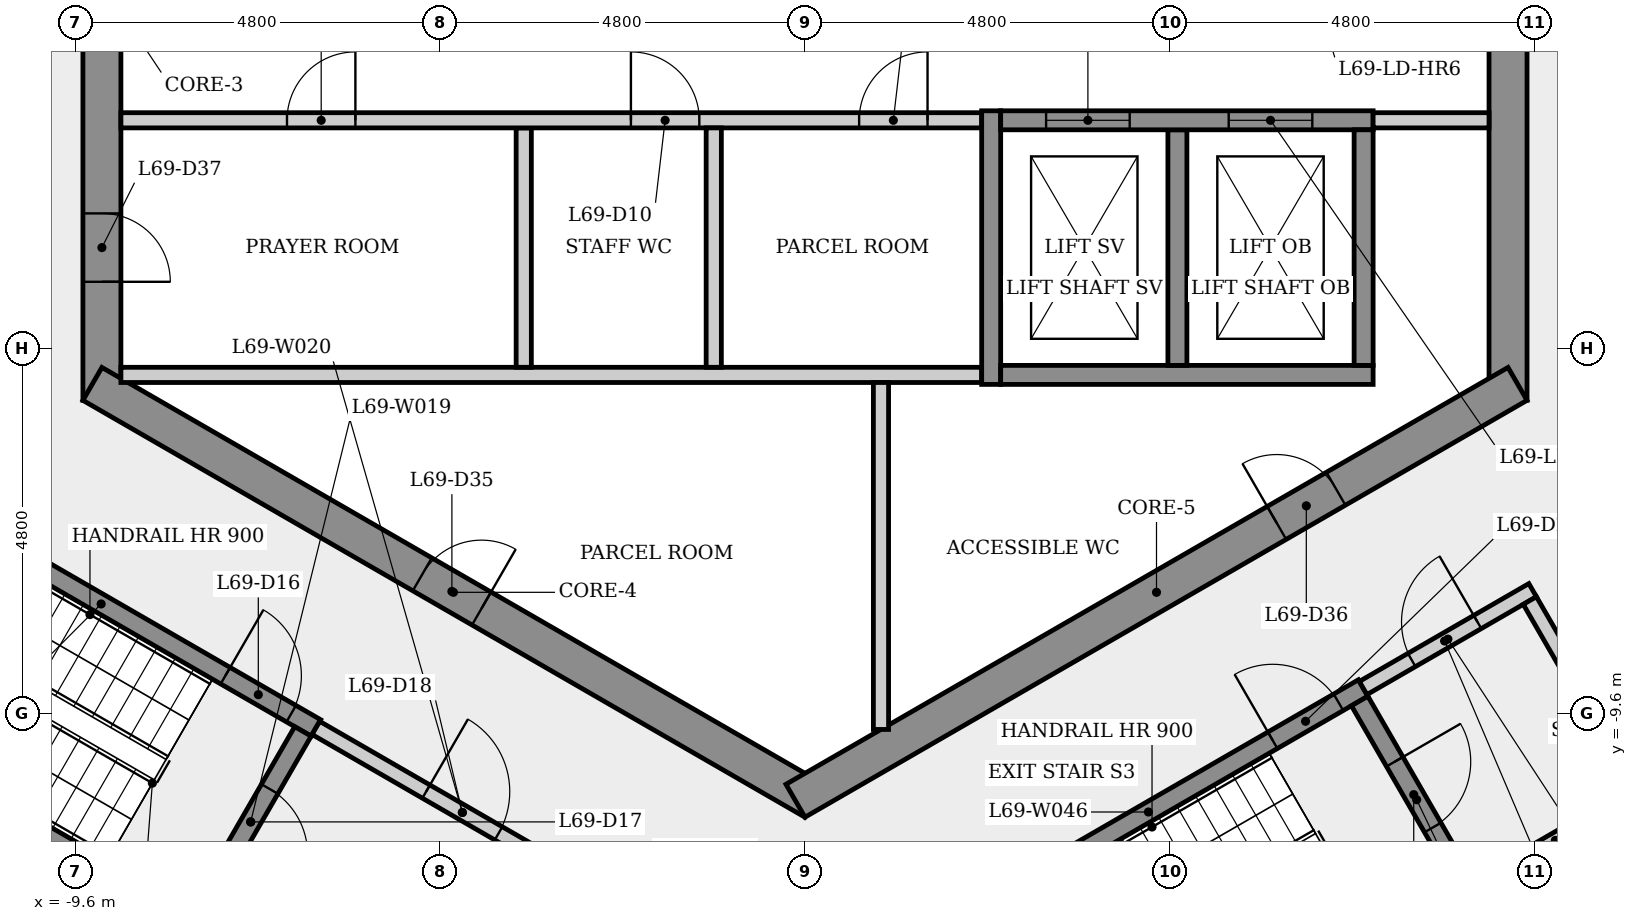
"""IFC4 building model, lengths in metres.
Left out: names, types, materials, properties, quantities, classifications, styles, units other than length and angle.
Written with IfcOpenShell. Run it as: python <this file> out.ifc"""

import sys

from ifc_helpers import new_model, si_unit, direction, frame, frame_2d, origin, place, context, subcontext, project, spatial, rectangle, extrude, element, fill, save


model = new_model("IFC4")
c1 = context("Model", 3, precision=1e-05, world=origin(), true_north=direction((0.0, 1.0)))
c2 = subcontext(c1, "Body", "Model", "MODEL_VIEW")
j1 = project(units=[si_unit("LENGTHUNIT", "METRE"), si_unit("PLANEANGLEUNIT", "RADIAN")], contexts=[c1])
p1 = place(None, origin())
s1 = spatial("IfcSite", under=j1, at=p1, CompositionType="ELEMENT")
p2 = place(p1, origin())
s2 = spatial("IfcBuilding", under=s1, at=p2, CompositionType="ELEMENT")
p3 = place(p2, frame((0.0, 0.0, 257.9)))
s3 = spatial("IfcBuildingStorey", under=s2, at=p3, CompositionType="ELEMENT", Elevation=257.9)
p4 = place(p3, frame((9.25, -5.485, 0.0), z_axis=(0.0, 0.0, 1.0), x_axis=(0.0, 1.0, 0.0)))
e1 = element("IfcWall", 1, at=p4, inside=s3, PredefinedType="SHEAR", context=c2, shape_type="SweptSolid", body=[
    extrude(rectangle(XDim=10.97, YDim=0.5, at=frame_2d((5.485, 0.0))), origin(), (0.0, 0.0, 1.0), 5.0),
])
p5 = place(p4, frame((4.685, 0.0, 0.0)))
e2 = element("IfcOpeningElement", 2, at=p5, cuts=e1, PredefinedType="OPENING", context=c2, shape_type="SweptSolid", body=[
    extrude(rectangle(XDim=1.6, YDim=2.1, at=frame_2d((0.8, 1.05))), frame((0.0, 0.26, 0.0), z_axis=(0.0, -1.0, 0.0), x_axis=(1.0, 0.0, 0.0)), (0.0, 0.0, 1.0), 0.52),
])
p6 = place(p3, frame((-9.25, 5.485, 0.0), z_axis=(0.0, 0.0, 1.0), x_axis=(0.0, -1.0, 0.0)))
e3 = element("IfcWall", 3, at=p6, inside=s3, PredefinedType="SHEAR", context=c2, shape_type="SweptSolid", body=[
    extrude(rectangle(XDim=10.97, YDim=0.5, at=frame_2d((5.485, 0.0))), origin(), (0.0, 0.0, 1.0), 5.0),
])
p7 = place(p6, frame((8.51, 0.0, 0.0)))
e4 = element("IfcOpeningElement", 4, at=p7, cuts=e3, PredefinedType="OPENING", context=c2, shape_type="SweptSolid", body=[
    extrude(rectangle(XDim=0.9, YDim=2.1, at=frame_2d((0.45, 1.05))), frame((0.0, 0.26, 0.0), z_axis=(0.0, -1.0, 0.0), x_axis=(1.0, 0.0, 0.0)), (0.0, 0.0, 1.0), 0.52),
])
p8 = place(p6, frame((4.685, 0.0, 0.0)))
e5 = element("IfcOpeningElement", 5, at=p8, cuts=e3, PredefinedType="OPENING", context=c2, shape_type="SweptSolid", body=[
    extrude(rectangle(XDim=1.6, YDim=2.1, at=frame_2d((0.8, 1.05))), frame((0.0, 0.26, 0.0), z_axis=(0.0, -1.0, 0.0), x_axis=(1.0, 0.0, 0.0)), (0.0, 0.0, 1.0), 0.52),
])
p9 = place(p3, frame((-9.375, -5.268, 0.0), z_axis=(0.0, 0.0, 1.0), x_axis=(0.866023993627, -0.500002442456, 0.0)))
e6 = element("IfcWall", 6, at=p9, inside=s3, PredefinedType="SHEAR", context=c2, shape_type="SweptSolid", body=[
    extrude(rectangle(XDim=10.97, YDim=0.5, at=frame_2d((5.485, 0.0))), origin(), (0.0, 0.0, 1.0), 5.0),
])
p10 = place(p9, frame((5.011, 0.0, 0.0)))
e7 = element("IfcOpeningElement", 7, at=p10, cuts=e6, PredefinedType="OPENING", context=c2, shape_type="SweptSolid", body=[
    extrude(rectangle(XDim=0.9, YDim=2.1, at=frame_2d((0.45, 1.05))), frame((0.0, 0.26, 0.0), z_axis=(0.0, -1.0, 0.0), x_axis=(1.0, 0.0, 0.0)), (0.0, 0.0, 1.0), 0.52),
])
p11 = place(p3, frame((-0.125, -10.753, 0.0), z_axis=(0.0, 0.0, 1.0), x_axis=(0.866023993627, 0.500002442456, 0.0)))
e8 = element("IfcWall", 8, at=p11, inside=s3, PredefinedType="SHEAR", context=c2, shape_type="SweptSolid", body=[
    extrude(rectangle(XDim=10.97, YDim=0.5, at=frame_2d((5.485, 0.0))), origin(), (0.0, 0.0, 1.0), 5.0),
])
p12 = place(p11, frame((7.311, 0.0, 0.0)))
e9 = element("IfcOpeningElement", 9, at=p12, cuts=e8, PredefinedType="OPENING", context=c2, shape_type="SweptSolid", body=[
    extrude(rectangle(XDim=0.9, YDim=2.1, at=frame_2d((0.45, 1.05))), frame((0.0, 0.26, 0.0), z_axis=(0.0, -1.0, 0.0), x_axis=(1.0, 0.0, 0.0)), (0.0, 0.0, 1.0), 0.52),
])
p13 = place(p3, frame((-12.085, -6.532, 0.0), z_axis=(0.0, 0.0, 1.0), x_axis=(0.866031063448, -0.499990197047, 0.0)))
e10 = element("IfcWall", 10, at=p13, inside=s3, PredefinedType="SHEAR", context=c2, shape_type="SweptSolid", body=[
    extrude(rectangle(XDim=6.525, YDim=0.25, at=frame_2d((3.263, 0.0))), origin(), (0.0, 0.0, 1.0), 4.6),
])
p14 = place(p13, frame((5.15, 0.0, 0.0)))
e11 = element("IfcOpeningElement", 11, at=p14, cuts=e10, PredefinedType="OPENING", context=c2, shape_type="SweptSolid", body=[
    extrude(rectangle(XDim=1.0, YDim=2.1, at=frame_2d((0.5, 1.05))), frame((0.0, 0.135, 0.0), z_axis=(0.0, -1.0, 0.0), x_axis=(1.0, 0.0, 0.0)), (0.0, 0.0, 1.0), 0.27),
])
p15 = place(p3, frame((-9.0, -5.15, 0.0), z_axis=(0.0, 0.0, 1.0), x_axis=(1.0, 0.0, 0.0)))
e12 = element("IfcWall", 12, at=p15, inside=s3, PredefinedType="PARTITIONING", context=c2, shape_type="SweptSolid", body=[
    extrude(rectangle(XDim=11.325, YDim=0.2, at=frame_2d((5.663, 0.0))), origin(), (0.0, 0.0, 1.0), 4.6),
])
p16 = place(p3, frame((-7.935, -12.393, 0.0), z_axis=(0.0, 0.0, 1.0), x_axis=(-0.866031063448, 0.499990197047, 0.0)))
e13 = element("IfcWall", 13, at=p16, inside=s3, PredefinedType="SHEAR", context=c2, shape_type="SweptSolid", body=[
    extrude(rectangle(XDim=6.525, YDim=0.25, at=frame_2d((3.263, 0.0))), origin(), (0.0, 0.0, 1.0), 4.6),
])
p17 = place(p3, frame((-6.605, -9.841, 0.0), z_axis=(0.0, 0.0, 1.0), x_axis=(-0.499996545922, -0.866027397988, 0.0)))
e14 = element("IfcWall", 14, at=p17, inside=s3, PredefinedType="SHEAR", context=c2, shape_type="SweptSolid", body=[
    extrude(rectangle(XDim=2.75, YDim=0.25, at=frame_2d((1.375, 0.0))), origin(), (0.0, 0.0, 1.0), 4.6),
])
p18 = place(p17, frame((0.875, 0.0, 0.0)))
e15 = element("IfcOpeningElement", 15, at=p18, cuts=e14, PredefinedType="OPENING", context=c2, shape_type="SweptSolid", body=[
    extrude(rectangle(XDim=1.0, YDim=2.1, at=frame_2d((0.5, 1.05))), frame((0.0, 0.135, 0.0), z_axis=(0.0, -1.0, 0.0), x_axis=(1.0, 0.0, 0.0)), (0.0, 0.0, 1.0), 0.27),
])
p19 = place(p3, frame((-6.435, -9.795, 0.0), z_axis=(0.0, 0.0, 1.0), x_axis=(0.866012907634, -0.500021643343, 0.0)))
e16 = element("IfcWall", 16, at=p19, inside=s3, PredefinedType="PARTITIONING", context=c2, shape_type="SweptSolid", body=[
    extrude(rectangle(XDim=4.45, YDim=0.2, at=frame_2d((2.225, 0.0))), origin(), (0.0, 0.0, 1.0), 4.6),
])
p20 = place(p19, frame((1.675, 0.0, 0.0)))
e17 = element("IfcOpeningElement", 17, at=p20, cuts=e16, PredefinedType="OPENING", context=c2, shape_type="SweptSolid", body=[
    extrude(rectangle(XDim=1.1, YDim=2.1, at=frame_2d((0.55, 1.05))), frame((0.0, 0.11, 0.0), z_axis=(0.0, -1.0, 0.0), x_axis=(1.0, 0.0, 0.0)), (0.0, 0.0, 1.0), 0.22),
])
p21 = place(p3, frame((-3.7, -1.9, 0.0), z_axis=(0.0, 0.0, 1.0), x_axis=(0.0, -1.0, 0.0)))
e18 = element("IfcWall", 18, at=p21, inside=s3, PredefinedType="PARTITIONING", context=c2, shape_type="SweptSolid", body=[
    extrude(rectangle(XDim=3.15, YDim=0.2, at=frame_2d((1.575, 0.0))), origin(), (0.0, 0.0, 1.0), 4.6),
])
p22 = place(p3, frame((-9.0, -1.8, 0.0), z_axis=(0.0, 0.0, 1.0), x_axis=(1.0, 0.0, 0.0)))
e19 = element("IfcWall", 19, at=p22, inside=s3, PredefinedType="PARTITIONING", context=c2, shape_type="SweptSolid", body=[
    extrude(rectangle(XDim=11.325, YDim=0.2, at=frame_2d((5.663, 0.0))), origin(), (0.0, 0.0, 1.0), 4.6),
])
p23 = place(p22, frame((2.185, 0.0, 0.0)))
e20 = element("IfcOpeningElement", 20, at=p23, cuts=e19, PredefinedType="OPENING", context=c2, shape_type="SweptSolid", body=[
    extrude(rectangle(XDim=0.9, YDim=2.1, at=frame_2d((0.45, 1.05))), frame((0.0, 0.11, 0.0), z_axis=(0.0, -1.0, 0.0), x_axis=(1.0, 0.0, 0.0)), (0.0, 0.0, 1.0), 0.22),
])
p24 = place(p22, frame((6.71, 0.0, 0.0)))
e21 = element("IfcOpeningElement", 21, at=p24, cuts=e19, PredefinedType="OPENING", context=c2, shape_type="SweptSolid", body=[
    extrude(rectangle(XDim=0.9, YDim=2.1, at=frame_2d((0.45, 1.05))), frame((0.0, 0.11, 0.0), z_axis=(0.0, -1.0, 0.0), x_axis=(1.0, 0.0, 0.0)), (0.0, 0.0, 1.0), 0.22),
])
p25 = place(p22, frame((9.713, 0.0, 0.0)))
e22 = element("IfcOpeningElement", 22, at=p25, cuts=e19, PredefinedType="OPENING", context=c2, shape_type="SweptSolid", body=[
    extrude(rectangle(XDim=0.9, YDim=2.1, at=frame_2d((0.45, 1.05))), frame((0.0, 0.11, 0.0), z_axis=(0.0, -1.0, 0.0), x_axis=(1.0, 0.0, 0.0)), (0.0, 0.0, 1.0), 0.22),
])
p26 = place(p3, frame((-1.2, -1.9, 0.0), z_axis=(0.0, 0.0, 1.0), x_axis=(0.0, -1.0, 0.0)))
e23 = element("IfcWall", 23, at=p26, inside=s3, PredefinedType="PARTITIONING", context=c2, shape_type="SweptSolid", body=[
    extrude(rectangle(XDim=3.15, YDim=0.2, at=frame_2d((1.575, 0.0))), origin(), (0.0, 0.0, 1.0), 4.6),
])
p27 = place(p3, frame((1.0, -5.25, 0.0), z_axis=(0.0, 0.0, 1.0), x_axis=(0.0, -1.0, 0.0)))
e24 = element("IfcWall", 24, at=p27, inside=s3, PredefinedType="PARTITIONING", context=c2, shape_type="SweptSolid", body=[
    extrude(rectangle(XDim=4.565, YDim=0.2, at=frame_2d((2.282, 0.0))), origin(), (0.0, 0.0, 1.0), 4.6),
])
p28 = place(p3, frame((1.693, -12.532, 0.0), z_axis=(0.0, 0.0, 1.0), x_axis=(0.866031063448, 0.499990197047, 0.0)))
e25 = element("IfcWall", 25, at=p28, inside=s3, PredefinedType="SHEAR", context=c2, shape_type="SweptSolid", body=[
    extrude(rectangle(XDim=6.525, YDim=0.25, at=frame_2d((3.263, 0.0))), origin(), (0.0, 0.0, 1.0), 4.6),
])
p29 = place(p28, frame((5.15, 0.0, 0.0)))
e26 = element("IfcOpeningElement", 26, at=p29, cuts=e25, PredefinedType="OPENING", context=c2, shape_type="SweptSolid", body=[
    extrude(rectangle(XDim=1.0, YDim=2.1, at=frame_2d((0.5, 1.05))), frame((0.0, 0.135, 0.0), z_axis=(0.0, -1.0, 0.0), x_axis=(1.0, 0.0, 0.0)), (0.0, 0.0, 1.0), 0.27),
])
p30 = place(p3, frame((2.45, -5.275, 0.0), z_axis=(0.0, 0.0, 1.0), x_axis=(0.0, 1.0, 0.0)))
e27 = element("IfcWall", 27, at=p30, inside=s3, PredefinedType="SHEAR", context=c2, shape_type="SweptSolid", body=[
    extrude(rectangle(XDim=3.6, YDim=0.25, at=frame_2d((1.8, 0.0))), origin(), (0.0, 0.0, 1.0), 4.6),
])
p31 = place(p3, frame((2.575, -5.15, 0.0), z_axis=(0.0, 0.0, 1.0), x_axis=(1.0, 0.0, 0.0)))
e28 = element("IfcWall", 28, at=p31, inside=s3, PredefinedType="SHEAR", context=c2, shape_type="SweptSolid", body=[
    extrude(rectangle(XDim=4.9, YDim=0.25, at=frame_2d((2.45, 0.0))), origin(), (0.0, 0.0, 1.0), 4.6),
])
p32 = place(p3, frame((4.9, -1.925, 0.0), z_axis=(0.0, 0.0, 1.0), x_axis=(0.0, -1.0, 0.0)))
e29 = element("IfcWall", 29, at=p32, inside=s3, PredefinedType="SHEAR", context=c2, shape_type="SweptSolid", body=[
    extrude(rectangle(XDim=3.1, YDim=0.25, at=frame_2d((1.55, 0.0))), origin(), (0.0, 0.0, 1.0), 5.0),
])
p33 = place(p3, frame((2.575, -1.8, 0.0), z_axis=(0.0, 0.0, 1.0), x_axis=(1.0, 0.0, 0.0)))
e30 = element("IfcWall", 30, at=p33, inside=s3, PredefinedType="SHEAR", context=c2, shape_type="SweptSolid", body=[
    extrude(rectangle(XDim=4.9, YDim=0.25, at=frame_2d((2.45, 0.0))), origin(), (0.0, 0.0, 1.0), 4.6),
])
p34 = place(p33, frame((0.597, 0.0, 0.0)))
e31 = element("IfcOpeningElement", 31, at=p34, cuts=e30, PredefinedType="OPENING", context=c2, shape_type="SweptSolid", body=[
    extrude(rectangle(XDim=1.1, YDim=2.1, at=frame_2d((0.55, 1.05))), frame((0.0, 0.135, 0.0), z_axis=(0.0, -1.0, 0.0), x_axis=(1.0, 0.0, 0.0)), (0.0, 0.0, 1.0), 0.27),
])
p35 = place(p33, frame((3.0, 0.0, 0.0)))
e32 = element("IfcOpeningElement", 32, at=p35, cuts=e30, PredefinedType="OPENING", context=c2, shape_type="SweptSolid", body=[
    extrude(rectangle(XDim=1.1, YDim=2.1, at=frame_2d((0.55, 1.05))), frame((0.0, 0.135, 0.0), z_axis=(0.0, -1.0, 0.0), x_axis=(1.0, 0.0, 0.0)), (0.0, 0.0, 1.0), 0.27),
])
p36 = place(p3, frame((7.298, -9.441, 0.0), z_axis=(0.0, 0.0, 1.0), x_axis=(0.50002537861, -0.866010750942, 0.0)))
e33 = element("IfcWall", 33, at=p36, inside=s3, PredefinedType="SHEAR", context=c2, shape_type="SweptSolid", body=[
    extrude(rectangle(XDim=3.0, YDim=0.25, at=frame_2d((1.5, 0.0))), origin(), (0.0, 0.0, 1.0), 4.6),
])
p37 = place(p36, frame((0.923, 0.0, 0.0)))
e34 = element("IfcOpeningElement", 34, at=p37, cuts=e33, PredefinedType="OPENING", context=c2, shape_type="SweptSolid", body=[
    extrude(rectangle(XDim=1.0, YDim=2.1, at=frame_2d((0.5, 1.05))), frame((0.0, 0.135, 0.0), z_axis=(0.0, -1.0, 0.0), x_axis=(1.0, 0.0, 0.0)), (0.0, 0.0, 1.0), 0.27),
])
p38 = place(p3, frame((7.344, -9.27, 0.0), z_axis=(0.0, 0.0, 1.0), x_axis=(0.866005588531, 0.500034319456, 0.0)))
e35 = element("IfcWall", 35, at=p38, inside=s3, PredefinedType="PARTITIONING", context=c2, shape_type="SweptSolid", body=[
    extrude(rectangle(XDim=2.575, YDim=0.2, at=frame_2d((1.288, 0.0))), origin(), (0.0, 0.0, 1.0), 4.6),
])
p39 = place(p38, frame((0.738, 0.0, 0.0)))
e36 = element("IfcOpeningElement", 36, at=p39, cuts=e35, PredefinedType="OPENING", context=c2, shape_type="SweptSolid", body=[
    extrude(rectangle(XDim=1.0, YDim=2.1, at=frame_2d((0.5, 1.05))), frame((0.0, 0.11, 0.0), z_axis=(0.0, -1.0, 0.0), x_axis=(1.0, 0.0, 0.0)), (0.0, 0.0, 1.0), 0.22),
])
p40 = place(p3, frame((7.35, -1.925, 0.0), z_axis=(0.0, 0.0, 1.0), x_axis=(0.0, -1.0, 0.0)))
e37 = element("IfcWall", 37, at=p40, inside=s3, PredefinedType="SHEAR", context=c2, shape_type="SweptSolid", body=[
    extrude(rectangle(XDim=3.1, YDim=0.25, at=frame_2d((1.55, 0.0))), origin(), (0.0, 0.0, 1.0), 4.6),
])
p41 = place(p3, frame((9.0, -1.8, 0.0), z_axis=(0.0, 0.0, 1.0), x_axis=(-1.0, 0.0, 0.0)))
e38 = element("IfcWall", 38, at=p41, inside=s3, PredefinedType="PARTITIONING", context=c2, shape_type="SweptSolid", body=[
    extrude(rectangle(XDim=1.525, YDim=0.2, at=frame_2d((0.763, 0.0))), origin(), (0.0, 0.0, 1.0), 4.6),
])
p42 = place(p3, frame((9.537, -8.119, 0.0), z_axis=(0.0, 0.0, 1.0), x_axis=(0.499990139034, -0.866031096941, 0.0)))
e39 = element("IfcWall", 39, at=p42, inside=s3, PredefinedType="PARTITIONING", context=c2, shape_type="SweptSolid", body=[
    extrude(rectangle(XDim=3.0, YDim=0.2, at=frame_2d((1.5, 0.0))), origin(), (0.0, 0.0, 1.0), 4.6),
])
p43 = place(p3, frame((10.901, -10.681, 0.0), z_axis=(0.0, 0.0, 1.0), x_axis=(-0.866007538022, -0.500030943131, 0.0)))
e40 = element("IfcWall", 40, at=p43, inside=s3, PredefinedType="PARTITIONING", context=c2, shape_type="SweptSolid", body=[
    extrude(rectangle(XDim=2.375, YDim=0.2, at=frame_2d((1.188, 0.0))), origin(), (0.0, 0.0, 1.0), 4.6),
])
p44 = place(p34, origin())
e41 = element("IfcDoor", 41, at=p44, inside=s3, OperationType="SLIDING_TO_LEFT", PredefinedType="DOOR", context=c2, shape_type="SweptSolid", body=[
    extrude(rectangle(XDim=1.1, YDim=2.1, at=frame_2d((0.55, 1.05))), frame((0.0, 0.025, 0.0), z_axis=(0.0, -1.0, 0.0), x_axis=(1.0, 0.0, 0.0)), (0.0, 0.0, 1.0), 0.05),
])
fill(e31, e41)
p45 = place(p35, origin())
e42 = element("IfcDoor", 42, at=p45, inside=s3, OperationType="SLIDING_TO_LEFT", PredefinedType="DOOR", context=c2, shape_type="SweptSolid", body=[
    extrude(rectangle(XDim=1.1, YDim=2.1, at=frame_2d((0.55, 1.05))), frame((0.0, 0.025, 0.0), z_axis=(0.0, -1.0, 0.0), x_axis=(1.0, 0.0, 0.0)), (0.0, 0.0, 1.0), 0.05),
])
fill(e32, e42)
p46 = place(p23, origin())
e43 = element("IfcDoor", 43, at=p46, inside=s3, OperationType="SINGLE_SWING_RIGHT", PredefinedType="DOOR", context=c2, shape_type="SweptSolid", body=[
    extrude(rectangle(XDim=0.9, YDim=2.1, at=frame_2d((0.45, 1.05))), frame((0.0, 0.025, 0.0), z_axis=(0.0, -1.0, 0.0), x_axis=(1.0, 0.0, 0.0)), (0.0, 0.0, 1.0), 0.05),
])
fill(e20, e43)
p47 = place(p24, origin())
e44 = element("IfcDoor", 44, at=p47, inside=s3, OperationType="SINGLE_SWING_LEFT", PredefinedType="DOOR", context=c2, shape_type="SweptSolid", body=[
    extrude(rectangle(XDim=0.9, YDim=2.1, at=frame_2d((0.45, 1.05))), frame((0.0, 0.025, 0.0), z_axis=(0.0, -1.0, 0.0), x_axis=(1.0, 0.0, 0.0)), (0.0, 0.0, 1.0), 0.05),
])
fill(e21, e44)
p48 = place(p25, origin())
e45 = element("IfcDoor", 45, at=p48, inside=s3, OperationType="SINGLE_SWING_RIGHT", PredefinedType="DOOR", context=c2, shape_type="SweptSolid", body=[
    extrude(rectangle(XDim=0.9, YDim=2.1, at=frame_2d((0.45, 1.05))), frame((0.0, 0.025, 0.0), z_axis=(0.0, -1.0, 0.0), x_axis=(1.0, 0.0, 0.0)), (0.0, 0.0, 1.0), 0.05),
])
fill(e22, e45)
p49 = place(p14, origin())
e46 = element("IfcDoor", 46, at=p49, inside=s3, OperationType="SINGLE_SWING_LEFT", PredefinedType="DOOR", context=c2, shape_type="SweptSolid", body=[
    extrude(rectangle(XDim=1.0, YDim=2.1, at=frame_2d((0.5, 1.05))), frame((0.0, 0.025, 0.0), z_axis=(0.0, -1.0, 0.0), x_axis=(1.0, 0.0, 0.0)), (0.0, 0.0, 1.0), 0.05),
])
fill(e11, e46)
p50 = place(p18, origin())
e47 = element("IfcDoor", 47, at=p50, inside=s3, OperationType="SINGLE_SWING_RIGHT", PredefinedType="DOOR", context=c2, shape_type="SweptSolid", body=[
    extrude(rectangle(XDim=1.0, YDim=2.1, at=frame_2d((0.5, 1.05))), frame((0.0, 0.025, 0.0), z_axis=(0.0, -1.0, 0.0), x_axis=(1.0, 0.0, 0.0)), (0.0, 0.0, 1.0), 0.05),
])
fill(e15, e47)
p51 = place(p20, origin())
e48 = element("IfcDoor", 48, at=p51, inside=s3, OperationType="SINGLE_SWING_LEFT", PredefinedType="DOOR", context=c2, shape_type="SweptSolid", body=[
    extrude(rectangle(XDim=1.1, YDim=2.1, at=frame_2d((0.55, 1.05))), frame((0.0, 0.025, 0.0), z_axis=(0.0, -1.0, 0.0), x_axis=(1.0, 0.0, 0.0)), (0.0, 0.0, 1.0), 0.05),
])
fill(e17, e48)
p52 = place(p29, origin())
e49 = element("IfcDoor", 49, at=p52, inside=s3, OperationType="SINGLE_SWING_LEFT", PredefinedType="DOOR", context=c2, shape_type="SweptSolid", body=[
    extrude(rectangle(XDim=1.0, YDim=2.1, at=frame_2d((0.5, 1.05))), frame((0.0, 0.025, 0.0), z_axis=(0.0, -1.0, 0.0), x_axis=(1.0, 0.0, 0.0)), (0.0, 0.0, 1.0), 0.05),
])
fill(e26, e49)
p53 = place(p39, origin())
e50 = element("IfcDoor", 50, at=p53, inside=s3, OperationType="SINGLE_SWING_RIGHT", PredefinedType="DOOR", context=c2, shape_type="SweptSolid", body=[
    extrude(rectangle(XDim=1.0, YDim=2.1, at=frame_2d((0.5, 1.05))), frame((0.0, 0.025, 0.0), z_axis=(0.0, -1.0, 0.0), x_axis=(1.0, 0.0, 0.0)), (0.0, 0.0, 1.0), 0.05),
])
fill(e36, e50)
p54 = place(p37, origin())
e51 = element("IfcDoor", 51, at=p54, inside=s3, OperationType="SINGLE_SWING_LEFT", PredefinedType="DOOR", context=c2, shape_type="SweptSolid", body=[
    extrude(rectangle(XDim=1.0, YDim=2.1, at=frame_2d((0.5, 1.05))), frame((0.0, 0.025, 0.0), z_axis=(0.0, -1.0, 0.0), x_axis=(1.0, 0.0, 0.0)), (0.0, 0.0, 1.0), 0.05),
])
fill(e34, e51)
p55 = place(p10, origin())
e52 = element("IfcDoor", 52, at=p55, inside=s3, OperationType="SINGLE_SWING_RIGHT", PredefinedType="DOOR", context=c2, shape_type="SweptSolid", body=[
    extrude(rectangle(XDim=0.9, YDim=2.1, at=frame_2d((0.45, 1.05))), frame((0.0, 0.025, 0.0), z_axis=(0.0, -1.0, 0.0), x_axis=(1.0, 0.0, 0.0)), (0.0, 0.0, 1.0), 0.05),
])
fill(e7, e52)
p56 = place(p12, origin())
e53 = element("IfcDoor", 53, at=p56, inside=s3, OperationType="SINGLE_SWING_LEFT", PredefinedType="DOOR", context=c2, shape_type="SweptSolid", body=[
    extrude(rectangle(XDim=0.9, YDim=2.1, at=frame_2d((0.45, 1.05))), frame((0.0, 0.025, 0.0), z_axis=(0.0, -1.0, 0.0), x_axis=(1.0, 0.0, 0.0)), (0.0, 0.0, 1.0), 0.05),
])
fill(e9, e53)
p57 = place(p7, origin())
e54 = element("IfcDoor", 54, at=p57, inside=s3, OperationType="SINGLE_SWING_RIGHT", PredefinedType="DOOR", context=c2, shape_type="SweptSolid", body=[
    extrude(rectangle(XDim=0.9, YDim=2.1, at=frame_2d((0.45, 1.05))), frame((0.0, 0.025, 0.0), z_axis=(0.0, -1.0, 0.0), x_axis=(1.0, 0.0, 0.0)), (0.0, 0.0, 1.0), 0.05),
])
fill(e4, e54)
save(model, sys.argv[1])
